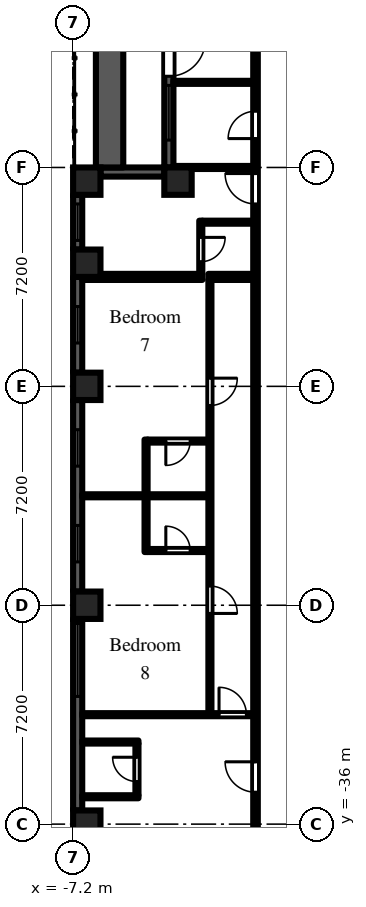
"""IFC4 building model, lengths in metres.
Left out: names, types, materials, properties, quantities, classifications, styles, units other than length and angle.
Written with IfcOpenShell. Run it as: python <this file> out.ifc"""

import sys

from ifc_helpers import new_model, si_unit, direction, frame, frame_2d, origin, origin_2d, place, context, subcontext, project, spatial, rectangle, extrude, element, fill, save


model = new_model("IFC4")
c1 = context("Model", 3, precision=1e-05, world=origin(), true_north=direction((0.0, 1.0)))
c2 = subcontext(c1, "Body", "Model", "MODEL_VIEW")
j1 = project(units=[si_unit("LENGTHUNIT", "METRE"), si_unit("PLANEANGLEUNIT", "RADIAN")], contexts=[c1])
p1 = place(None, origin())
s1 = spatial("IfcSite", under=j1, at=p1, CompositionType="ELEMENT")
p2 = place(p1, origin())
s2 = spatial("IfcBuilding", under=s1, at=p2, CompositionType="ELEMENT")
p3 = place(p2, frame((0.0, 0.0, 53.7)))
s3 = spatial("IfcBuildingStorey", under=s2, at=p3, CompositionType="ELEMENT", Elevation=53.7)
for number, where, z_axis, x_axis in (
    (1, (-6.75, -36.0, 0.0), (0.0, 0.0, 1.0), (1.0, 0.0, 0.0)),
    (2, (-6.75, -28.8, 0.0), (0.0, 0.0, 1.0), (1.0, 0.0, 0.0)),
    (3, (-6.75, -21.6, 0.0), (0.0, 0.0, 1.0), (1.0, 0.0, 0.0)),
    (4, (-6.75, -17.55, 0.0), (0.0, 0.0, 1.0), (1.0, 0.0, 0.0)),
    (5, (-6.75, -14.85, 0.0), (0.0, 0.0, 1.0), (1.0, 0.0, 0.0)),
    (6, (-3.75, -14.85, 0.0), (0.0, 0.0, 1.0), (1.0, 0.0, 0.0)),
):
    element("IfcColumn", number, at=place(p3, frame(where, z_axis=z_axis, x_axis=x_axis)), inside=s3, PredefinedType="COLUMN", context=c2, shape_type="SweptSolid", body=[
        extrude(rectangle(XDim=0.9, YDim=0.9, at=origin_2d()), origin(), (0.0, 0.0, 1.0), 3.0),
    ])
p4 = place(p3, frame((-4.05, -7.2, 0.0), z_axis=(0.0, 0.0, 1.0), x_axis=(0.0, -1.0, 0.0)))
e7 = element("IfcWall", 7, at=p4, inside=s3, PredefinedType="SOLIDWALL", context=c2, shape_type="SweptSolid", body=[
    extrude(rectangle(XDim=7.2, YDim=0.3, at=frame_2d((3.6, 0.0))), origin(), (0.0, 0.0, 1.0), 2.1),
])
p5 = place(p4, frame((3.0, 0.0, 0.0)))
e8 = element("IfcOpeningElement", 8, at=p5, cuts=e7, PredefinedType="OPENING", context=c2, shape_type="SweptSolid", body=[
    extrude(rectangle(XDim=1.2, YDim=2.05, at=frame_2d((0.6, 1.025))), frame((0.0, 0.16, 0.0), z_axis=(0.0, -1.0, 0.0), x_axis=(1.0, 0.0, 0.0)), (0.0, 0.0, 1.0), 0.32),
])
p6 = place(p4, frame((0.9, 0.0, 0.2)))
e9 = element("IfcOpeningElement", 9, at=p6, cuts=e7, PredefinedType="OPENING", context=c2, shape_type="SweptSolid", body=[
    extrude(rectangle(XDim=1.8, YDim=1.85, at=frame_2d((0.9, 0.925))), frame((0.0, 0.16, 0.0), z_axis=(0.0, -1.0, 0.0), x_axis=(1.0, 0.0, 0.0)), (0.0, 0.0, 1.0), 0.32),
])
p7 = place(p4, frame((4.5, 0.0, 0.2)))
e10 = element("IfcOpeningElement", 10, at=p7, cuts=e7, PredefinedType="OPENING", context=c2, shape_type="SweptSolid", body=[
    extrude(rectangle(XDim=1.8, YDim=1.85, at=frame_2d((0.9, 0.925))), frame((0.0, 0.16, 0.0), z_axis=(0.0, -1.0, 0.0), x_axis=(1.0, 0.0, 0.0)), (0.0, 0.0, 1.0), 0.32),
])
p8 = place(p3, frame((-4.2, -14.55, 0.0), z_axis=(0.0, 0.0, 1.0), x_axis=(-1.0, 0.0, 0.0)))
e11 = element("IfcWall", 11, at=p8, inside=s3, PredefinedType="SOLIDWALL", context=c2, shape_type="SweptSolid", body=[
    extrude(rectangle(XDim=2.1, YDim=0.3, at=frame_2d((1.05, 0.0))), origin(), (0.0, 0.0, 1.0), 2.1),
])
p9 = place(p3, frame((-7.05, -15.3, 0.0), z_axis=(0.0, 0.0, 1.0), x_axis=(0.0, -1.0, 0.0)))
e12 = element("IfcWall", 12, at=p9, inside=s3, PredefinedType="SOLIDWALL", context=c2, shape_type="SweptSolid", body=[
    extrude(rectangle(XDim=1.8, YDim=0.3, at=frame_2d((0.9, 0.0))), origin(), (0.0, 0.0, 1.0), 2.1),
])
p10 = place(p9, frame((0.3, 0.0, 0.2)))
e13 = element("IfcOpeningElement", 13, at=p10, cuts=e12, PredefinedType="OPENING", context=c2, shape_type="SweptSolid", body=[
    extrude(rectangle(XDim=1.2, YDim=1.85, at=frame_2d((0.6, 0.925))), frame((0.0, 0.16, 0.0), z_axis=(0.0, -1.0, 0.0), x_axis=(1.0, 0.0, 0.0)), (0.0, 0.0, 1.0), 0.32),
])
p11 = place(p3, frame((-7.05, -18.0, 0.0), z_axis=(0.0, 0.0, 1.0), x_axis=(0.0, -1.0, 0.0)))
e14 = element("IfcWall", 14, at=p11, inside=s3, PredefinedType="SOLIDWALL", context=c2, shape_type="SweptSolid", body=[
    extrude(rectangle(XDim=3.15, YDim=0.3, at=frame_2d((1.575, 0.0))), origin(), (0.0, 0.0, 1.0), 2.1),
])
p12 = place(p11, frame((0.975, 0.0, 0.2)))
e15 = element("IfcOpeningElement", 15, at=p12, cuts=e14, PredefinedType="OPENING", context=c2, shape_type="SweptSolid", body=[
    extrude(rectangle(XDim=1.2, YDim=1.85, at=frame_2d((0.6, 0.925))), frame((0.0, 0.16, 0.0), z_axis=(0.0, -1.0, 0.0), x_axis=(1.0, 0.0, 0.0)), (0.0, 0.0, 1.0), 0.32),
])
p13 = place(p3, frame((-7.05, -22.05, 0.0), z_axis=(0.0, 0.0, 1.0), x_axis=(0.0, -1.0, 0.0)))
e16 = element("IfcWall", 16, at=p13, inside=s3, PredefinedType="SOLIDWALL", context=c2, shape_type="SweptSolid", body=[
    extrude(rectangle(XDim=6.3, YDim=0.3, at=frame_2d((3.15, 0.0))), origin(), (0.0, 0.0, 1.0), 2.1),
])
p14 = place(p13, frame((0.975, 0.0, 0.2)))
e17 = element("IfcOpeningElement", 17, at=p14, cuts=e16, PredefinedType="OPENING", context=c2, shape_type="SweptSolid", body=[
    extrude(rectangle(XDim=1.2, YDim=1.85, at=frame_2d((0.6, 0.925))), frame((0.0, 0.16, 0.0), z_axis=(0.0, -1.0, 0.0), x_axis=(1.0, 0.0, 0.0)), (0.0, 0.0, 1.0), 0.32),
])
p15 = place(p13, frame((4.125, 0.0, 0.2)))
e18 = element("IfcOpeningElement", 18, at=p15, cuts=e16, PredefinedType="OPENING", context=c2, shape_type="SweptSolid", body=[
    extrude(rectangle(XDim=1.2, YDim=1.85, at=frame_2d((0.6, 0.925))), frame((0.0, 0.16, 0.0), z_axis=(0.0, -1.0, 0.0), x_axis=(1.0, 0.0, 0.0)), (0.0, 0.0, 1.0), 0.32),
])
p16 = place(p3, frame((-7.05, -29.25, 0.0), z_axis=(0.0, 0.0, 1.0), x_axis=(0.0, -1.0, 0.0)))
e19 = element("IfcWall", 19, at=p16, inside=s3, PredefinedType="SOLIDWALL", context=c2, shape_type="SweptSolid", body=[
    extrude(rectangle(XDim=6.3, YDim=0.3, at=frame_2d((3.15, 0.0))), origin(), (0.0, 0.0, 1.0), 2.1),
])
p17 = place(p16, frame((0.15, 0.0, 0.2)))
e20 = element("IfcOpeningElement", 20, at=p17, cuts=e19, PredefinedType="OPENING", context=c2, shape_type="SweptSolid", body=[
    extrude(rectangle(XDim=2.4, YDim=1.85, at=frame_2d((1.2, 0.925))), frame((0.0, 0.16, 0.0), z_axis=(0.0, -1.0, 0.0), x_axis=(1.0, 0.0, 0.0)), (0.0, 0.0, 1.0), 0.32),
])
p18 = place(p3, frame((-6.0, -14.4, 0.0), z_axis=(0.0, 0.0, 1.0), x_axis=(0.0, 1.0, 0.0)))
e21 = element("IfcWall", 21, at=p18, inside=s3, PredefinedType="PARAPET", context=c2, shape_type="SweptSolid", body=[
    extrude(rectangle(XDim=7.2, YDim=0.9, at=frame_2d((3.6, 0.0))), origin(), (0.0, 0.0, 1.0), 0.8),
])
for number, where, z_axis, x_axis in (
    (22, (-6.9, -35.1, 0.0), (0.0, 0.0, 1.0), (1.0, 0.0, 0.0)),
    (23, (-6.9, -33.3, 0.0), (0.0, 0.0, 1.0), (1.0, 0.0, 0.0)),
):
    element("IfcWall", number, at=place(p3, frame(where, z_axis=z_axis, x_axis=x_axis)), inside=s3, PredefinedType="PARTITIONING", context=c2, shape_type="SweptSolid", body=[
        extrude(rectangle(XDim=1.85, YDim=0.1, at=frame_2d((0.925, 0.0))), origin(), (0.0, 0.0, 1.0), 2.575),
    ])
p19 = place(p3, frame((-6.9, -32.4, 0.0), z_axis=(0.0, 0.0, 1.0), x_axis=(1.0, 0.0, 0.0)))
e24 = element("IfcWall", 24, at=p19, inside=s3, PredefinedType="PARTITIONING", context=c2, shape_type="SweptSolid", body=[
    extrude(rectangle(XDim=5.625, YDim=0.1, at=frame_2d((2.812, 0.0))), origin(), (0.0, 0.0, 1.0), 2.575),
])
p20 = place(p19, frame((4.5, 0.0, 0.0)))
e25 = element("IfcOpeningElement", 25, at=p20, cuts=e24, PredefinedType="OPENING", context=c2, shape_type="SweptSolid", body=[
    extrude(rectangle(XDim=0.9, YDim=2.1, at=frame_2d((0.45, 1.05))), frame((0.0, 0.06, 0.0), z_axis=(0.0, -1.0, 0.0), x_axis=(1.0, 0.0, 0.0)), (0.0, 0.0, 1.0), 0.12),
])
p21 = place(p3, frame((-6.9, -25.2, 0.0), z_axis=(0.0, 0.0, 1.0), x_axis=(1.0, 0.0, 0.0)))
e26 = element("IfcWall", 26, at=p21, inside=s3, PredefinedType="PARTITIONING", context=c2, shape_type="SweptSolid", body=[
    extrude(rectangle(XDim=4.15, YDim=0.1, at=frame_2d((2.075, 0.0))), origin(), (0.0, 0.0, 1.0), 2.575),
])
p22 = place(p3, frame((-6.9, -18.0, 0.0), z_axis=(0.0, 0.0, 1.0), x_axis=(1.0, 0.0, 0.0)))
e27 = element("IfcWall", 27, at=p22, inside=s3, PredefinedType="PARTITIONING", context=c2, shape_type="SweptSolid", body=[
    extrude(rectangle(XDim=3.95, YDim=0.2, at=frame_2d((1.975, 0.0))), origin(), (0.0, 0.0, 1.0), 2.575),
])
p23 = place(p3, frame((-5.1, -35.05, 0.0), z_axis=(0.0, 0.0, 1.0), x_axis=(0.0, 1.0, 0.0)))
e28 = element("IfcWall", 28, at=p23, inside=s3, PredefinedType="PARTITIONING", context=c2, shape_type="SweptSolid", body=[
    extrude(rectangle(XDim=1.7, YDim=0.1, at=frame_2d((0.85, 0.0))), origin(), (0.0, 0.0, 1.0), 2.575),
])
p24 = place(p23, frame((0.45, 0.0, 0.0)))
e29 = element("IfcOpeningElement", 29, at=p24, cuts=e28, PredefinedType="OPENING", context=c2, shape_type="SweptSolid", body=[
    extrude(rectangle(XDim=0.8, YDim=2.1, at=frame_2d((0.4, 1.05))), frame((0.0, 0.06, 0.0), z_axis=(0.0, -1.0, 0.0), x_axis=(1.0, 0.0, 0.0)), (0.0, 0.0, 1.0), 0.12),
])
p25 = place(p3, frame((-4.8, -27.05, 0.0), z_axis=(0.0, 0.0, 1.0), x_axis=(0.0, 1.0, 0.0)))
e30 = element("IfcWall", 30, at=p25, inside=s3, PredefinedType="PARTITIONING", context=c2, shape_type="SweptSolid", body=[
    extrude(rectangle(XDim=3.7, YDim=0.1, at=frame_2d((1.85, 0.0))), origin(), (0.0, 0.0, 1.0), 2.575),
])
p26 = place(p3, frame((-4.75, -27.0, 0.0), z_axis=(0.0, 0.0, 1.0), x_axis=(1.0, 0.0, 0.0)))
e31 = element("IfcWall", 31, at=p26, inside=s3, PredefinedType="PARTITIONING", context=c2, shape_type="SweptSolid", body=[
    extrude(rectangle(XDim=2.0, YDim=0.1, at=frame_2d((1.0, 0.0))), origin(), (0.0, 0.0, 1.0), 2.575),
])
p27 = place(p26, frame((0.6, 0.0, 0.0)))
e32 = element("IfcOpeningElement", 32, at=p27, cuts=e31, PredefinedType="OPENING", context=c2, shape_type="SweptSolid", body=[
    extrude(rectangle(XDim=0.8, YDim=2.1, at=frame_2d((0.4, 1.05))), frame((0.0, 0.06, 0.0), z_axis=(0.0, -1.0, 0.0), x_axis=(1.0, 0.0, 0.0)), (0.0, 0.0, 1.0), 0.12),
])
p28 = place(p3, frame((-4.75, -23.4, 0.0), z_axis=(0.0, 0.0, 1.0), x_axis=(1.0, 0.0, 0.0)))
e33 = element("IfcWall", 33, at=p28, inside=s3, PredefinedType="PARTITIONING", context=c2, shape_type="SweptSolid", body=[
    extrude(rectangle(XDim=2.0, YDim=0.1, at=frame_2d((1.0, 0.0))), origin(), (0.0, 0.0, 1.0), 2.575),
])
p29 = place(p28, frame((0.6, 0.0, 0.0)))
e34 = element("IfcOpeningElement", 34, at=p29, cuts=e33, PredefinedType="OPENING", context=c2, shape_type="SweptSolid", body=[
    extrude(rectangle(XDim=0.8, YDim=2.1, at=frame_2d((0.4, 1.05))), frame((0.0, 0.06, 0.0), z_axis=(0.0, -1.0, 0.0), x_axis=(1.0, 0.0, 0.0)), (0.0, 0.0, 1.0), 0.12),
])
for number, where, z_axis, x_axis in (
    (35, (-3.9, -14.4, 0.0), (0.0, 0.0, 1.0), (1.0, 0.0, 0.0)),
    (36, (-3.9, -11.6, 0.0), (0.0, 0.0, 1.0), (1.0, 0.0, 0.0)),
):
    element("IfcWall", number, at=place(p3, frame(where, z_axis=z_axis, x_axis=x_axis)), inside=s3, PredefinedType="PARTITIONING", context=c2, shape_type="SweptSolid", body=[
        extrude(rectangle(XDim=2.625, YDim=0.1, at=frame_2d((1.312, 0.0))), origin(), (0.0, 0.0, 1.0), 2.575),
    ])
p30 = place(p3, frame((-3.0, -17.9, 0.0), z_axis=(0.0, 0.0, 1.0), x_axis=(0.0, 1.0, 0.0)))
e37 = element("IfcWall", 37, at=p30, inside=s3, PredefinedType="PARTITIONING", context=c2, shape_type="SweptSolid", body=[
    extrude(rectangle(XDim=1.75, YDim=0.1, at=frame_2d((0.875, 0.0))), origin(), (0.0, 0.0, 1.0), 2.575),
])
p31 = place(p30, frame((0.4, 0.0, 0.0)))
e38 = element("IfcOpeningElement", 38, at=p31, cuts=e37, PredefinedType="OPENING", context=c2, shape_type="SweptSolid", body=[
    extrude(rectangle(XDim=0.8, YDim=2.1, at=frame_2d((0.4, 1.05))), frame((0.0, 0.06, 0.0), z_axis=(0.0, -1.0, 0.0), x_axis=(1.0, 0.0, 0.0)), (0.0, 0.0, 1.0), 0.12),
])
p32 = place(p3, frame((-2.95, -16.2, 0.0), z_axis=(0.0, 0.0, 1.0), x_axis=(1.0, 0.0, 0.0)))
e39 = element("IfcWall", 39, at=p32, inside=s3, PredefinedType="PARTITIONING", context=c2, shape_type="SweptSolid", body=[
    extrude(rectangle(XDim=1.675, YDim=0.1, at=frame_2d((0.837, 0.0))), origin(), (0.0, 0.0, 1.0), 2.575),
])
p33 = place(p3, frame((-2.7, -32.35, 0.0), z_axis=(0.0, 0.0, 1.0), x_axis=(0.0, 1.0, 0.0)))
e40 = element("IfcWall", 40, at=p33, inside=s3, PredefinedType="PARTITIONING", context=c2, shape_type="SweptSolid", body=[
    extrude(rectangle(XDim=14.25, YDim=0.1, at=frame_2d((7.125, 0.0))), origin(), (0.0, 0.0, 1.0), 2.575),
])
p34 = place(p33, frame((3.28, 0.0, 0.0)))
e41 = element("IfcOpeningElement", 41, at=p34, cuts=e40, PredefinedType="OPENING", context=c2, shape_type="SweptSolid", body=[
    extrude(rectangle(XDim=0.9, YDim=2.1, at=frame_2d((0.45, 1.05))), frame((0.0, 0.06, 0.0), z_axis=(0.0, -1.0, 0.0), x_axis=(1.0, 0.0, 0.0)), (0.0, 0.0, 1.0), 0.12),
])
p35 = place(p33, frame((10.12, 0.0, 0.0)))
e42 = element("IfcOpeningElement", 42, at=p35, cuts=e40, PredefinedType="OPENING", context=c2, shape_type="SweptSolid", body=[
    extrude(rectangle(XDim=0.9, YDim=2.1, at=frame_2d((0.45, 1.05))), frame((0.0, 0.06, 0.0), z_axis=(0.0, -1.0, 0.0), x_axis=(1.0, 0.0, 0.0)), (0.0, 0.0, 1.0), 0.12),
])
p36 = place(p3, frame((-2.75, -18.0, 0.0), z_axis=(0.0, 0.0, 1.0), x_axis=(1.0, 0.0, 0.0)))
e43 = element("IfcWall", 43, at=p36, inside=s3, PredefinedType="PARTITIONING", context=c2, shape_type="SweptSolid", body=[
    extrude(rectangle(XDim=1.475, YDim=0.2, at=frame_2d((0.738, 0.0))), origin(), (0.0, 0.0, 1.0), 2.575),
])
p37 = place(p3, frame((-1.2, -36.5, 0.0), z_axis=(0.0, 0.0, 1.0), x_axis=(0.0, 1.0, 0.0)))
e44 = element("IfcWall", 44, at=p37, inside=s3, PredefinedType="PARTITIONING", context=c2, shape_type="SweptSolid", body=[
    extrude(rectangle(XDim=35.225, YDim=0.15, at=frame_2d((17.613, 0.0))), origin(), (0.0, 0.0, 1.0), 2.575),
])
p38 = place(p37, frame((31.85, 0.0, 0.0)))
e45 = element("IfcOpeningElement", 45, at=p38, cuts=e44, PredefinedType="OPENING", context=c2, shape_type="SweptSolid", body=[
    extrude(rectangle(XDim=0.9, YDim=2.1, at=frame_2d((0.45, 1.05))), frame((0.0, 0.085, 0.0), z_axis=(0.0, -1.0, 0.0), x_axis=(1.0, 0.0, 0.0)), (0.0, 0.0, 1.0), 0.17),
])
p39 = place(p37, frame((23.05, 0.0, 0.0)))
e46 = element("IfcOpeningElement", 46, at=p39, cuts=e44, PredefinedType="OPENING", context=c2, shape_type="SweptSolid", body=[
    extrude(rectangle(XDim=0.9, YDim=2.1, at=frame_2d((0.45, 1.05))), frame((0.0, 0.085, 0.0), z_axis=(0.0, -1.0, 0.0), x_axis=(1.0, 0.0, 0.0)), (0.0, 0.0, 1.0), 0.17),
])
p40 = place(p37, frame((26.65, 0.0, 0.0)))
e47 = element("IfcOpeningElement", 47, at=p40, cuts=e44, PredefinedType="OPENING", context=c2, shape_type="SweptSolid", body=[
    extrude(rectangle(XDim=0.9, YDim=2.1, at=frame_2d((0.45, 1.05))), frame((0.0, 0.085, 0.0), z_axis=(0.0, -1.0, 0.0), x_axis=(1.0, 0.0, 0.0)), (0.0, 0.0, 1.0), 0.17),
])
p41 = place(p37, frame((20.9, 0.0, 0.0)))
e48 = element("IfcOpeningElement", 48, at=p41, cuts=e44, PredefinedType="OPENING", context=c2, shape_type="SweptSolid", body=[
    extrude(rectangle(XDim=1.0, YDim=2.1, at=frame_2d((0.5, 1.05))), frame((0.0, 0.085, 0.0), z_axis=(0.0, -1.0, 0.0), x_axis=(1.0, 0.0, 0.0)), (0.0, 0.0, 1.0), 0.17),
])
p42 = place(p37, frame((1.55, 0.0, 0.0)))
e49 = element("IfcOpeningElement", 49, at=p42, cuts=e44, PredefinedType="OPENING", context=c2, shape_type="SweptSolid", body=[
    extrude(rectangle(XDim=1.0, YDim=2.1, at=frame_2d((0.5, 1.05))), frame((0.0, 0.085, 0.0), z_axis=(0.0, -1.0, 0.0), x_axis=(1.0, 0.0, 0.0)), (0.0, 0.0, 1.0), 0.17),
])
p43 = place(p5, origin())
e50 = element("IfcDoor", 50, at=p43, inside=s3, OperationType="SINGLE_SWING_LEFT", PredefinedType="DOOR", context=c2, shape_type="SweptSolid", body=[
    extrude(rectangle(XDim=1.2, YDim=2.05, at=frame_2d((0.6, 1.025))), frame((0.0, 0.025, 0.0), z_axis=(0.0, -1.0, 0.0), x_axis=(1.0, 0.0, 0.0)), (0.0, 0.0, 1.0), 0.05),
])
fill(e8, e50)
p44 = place(p7, origin())
e51 = element("IfcWindow", 51, at=p44, inside=s3, PartitioningType="SINGLE_PANEL", PredefinedType="WINDOW", context=c2, shape_type="SweptSolid", body=[
    extrude(rectangle(XDim=1.8, YDim=1.85, at=frame_2d((0.9, 0.925))), frame((0.0, 0.03, 0.0), z_axis=(0.0, -1.0, 0.0), x_axis=(1.0, 0.0, 0.0)), (0.0, 0.0, 1.0), 0.06),
])
fill(e10, e51)
p45 = place(p10, origin())
e52 = element("IfcWindow", 52, at=p45, inside=s3, PartitioningType="SINGLE_PANEL", PredefinedType="WINDOW", context=c2, shape_type="SweptSolid", body=[
    extrude(rectangle(XDim=1.2, YDim=1.85, at=frame_2d((0.6, 0.925))), frame((0.0, 0.03, 0.0), z_axis=(0.0, -1.0, 0.0), x_axis=(1.0, 0.0, 0.0)), (0.0, 0.0, 1.0), 0.06),
])
fill(e13, e52)
p46 = place(p12, origin())
e53 = element("IfcWindow", 53, at=p46, inside=s3, PartitioningType="SINGLE_PANEL", PredefinedType="WINDOW", context=c2, shape_type="SweptSolid", body=[
    extrude(rectangle(XDim=1.2, YDim=1.85, at=frame_2d((0.6, 0.925))), frame((0.0, 0.03, 0.0), z_axis=(0.0, -1.0, 0.0), x_axis=(1.0, 0.0, 0.0)), (0.0, 0.0, 1.0), 0.06),
])
fill(e15, e53)
p47 = place(p14, origin())
e54 = element("IfcWindow", 54, at=p47, inside=s3, PartitioningType="SINGLE_PANEL", PredefinedType="WINDOW", context=c2, shape_type="SweptSolid", body=[
    extrude(rectangle(XDim=1.2, YDim=1.85, at=frame_2d((0.6, 0.925))), frame((0.0, 0.03, 0.0), z_axis=(0.0, -1.0, 0.0), x_axis=(1.0, 0.0, 0.0)), (0.0, 0.0, 1.0), 0.06),
])
fill(e17, e54)
p48 = place(p15, origin())
e55 = element("IfcWindow", 55, at=p48, inside=s3, PartitioningType="SINGLE_PANEL", PredefinedType="WINDOW", context=c2, shape_type="SweptSolid", body=[
    extrude(rectangle(XDim=1.2, YDim=1.85, at=frame_2d((0.6, 0.925))), frame((0.0, 0.03, 0.0), z_axis=(0.0, -1.0, 0.0), x_axis=(1.0, 0.0, 0.0)), (0.0, 0.0, 1.0), 0.06),
])
fill(e18, e55)
p49 = place(p17, origin())
e56 = element("IfcWindow", 56, at=p49, inside=s3, PartitioningType="SINGLE_PANEL", PredefinedType="WINDOW", context=c2, shape_type="SweptSolid", body=[
    extrude(rectangle(XDim=2.4, YDim=1.85, at=frame_2d((1.2, 0.925))), frame((0.0, 0.03, 0.0), z_axis=(0.0, -1.0, 0.0), x_axis=(1.0, 0.0, 0.0)), (0.0, 0.0, 1.0), 0.06),
])
fill(e20, e56)
p50 = place(p39, origin())
e57 = element("IfcDoor", 57, at=p50, inside=s3, OperationType="SINGLE_SWING_LEFT", PredefinedType="DOOR", context=c2, shape_type="SweptSolid", body=[
    extrude(rectangle(XDim=0.9, YDim=2.1, at=frame_2d((0.45, 1.05))), frame((0.0, 0.025, 0.0), z_axis=(0.0, -1.0, 0.0), x_axis=(1.0, 0.0, 0.0)), (0.0, 0.0, 1.0), 0.05),
])
fill(e46, e57)
p51 = place(p31, frame((0.8, 0.0, 0.0), z_axis=(0.0, 0.0, 1.0), x_axis=(-1.0, 0.0, 0.0)))
e58 = element("IfcDoor", 58, at=p51, inside=s3, OperationType="SINGLE_SWING_LEFT", PredefinedType="DOOR", context=c2, shape_type="SweptSolid", body=[
    extrude(rectangle(XDim=0.8, YDim=2.1, at=frame_2d((0.4, 1.05))), frame((0.0, 0.025, 0.0), z_axis=(0.0, -1.0, 0.0), x_axis=(1.0, 0.0, 0.0)), (0.0, 0.0, 1.0), 0.05),
])
fill(e38, e58)
p52 = place(p41, origin())
e59 = element("IfcDoor", 59, at=p52, inside=s3, OperationType="SINGLE_SWING_RIGHT", PredefinedType="DOOR", context=c2, shape_type="SweptSolid", body=[
    extrude(rectangle(XDim=1.0, YDim=2.1, at=frame_2d((0.5, 1.05))), frame((0.0, 0.025, 0.0), z_axis=(0.0, -1.0, 0.0), x_axis=(1.0, 0.0, 0.0)), (0.0, 0.0, 1.0), 0.05),
])
fill(e48, e59)
p53 = place(p24, origin())
e60 = element("IfcDoor", 60, at=p53, inside=s3, OperationType="SINGLE_SWING_RIGHT", PredefinedType="DOOR", context=c2, shape_type="SweptSolid", body=[
    extrude(rectangle(XDim=0.8, YDim=2.1, at=frame_2d((0.4, 1.05))), frame((0.0, 0.025, 0.0), z_axis=(0.0, -1.0, 0.0), x_axis=(1.0, 0.0, 0.0)), (0.0, 0.0, 1.0), 0.05),
])
fill(e29, e60)
p54 = place(p42, origin())
e61 = element("IfcDoor", 61, at=p54, inside=s3, OperationType="SINGLE_SWING_RIGHT", PredefinedType="DOOR", context=c2, shape_type="SweptSolid", body=[
    extrude(rectangle(XDim=1.0, YDim=2.1, at=frame_2d((0.5, 1.05))), frame((0.0, 0.025, 0.0), z_axis=(0.0, -1.0, 0.0), x_axis=(1.0, 0.0, 0.0)), (0.0, 0.0, 1.0), 0.05),
])
fill(e49, e61)
p55 = place(p34, frame((0.9, 0.0, 0.0), z_axis=(0.0, 0.0, 1.0), x_axis=(-1.0, 0.0, 0.0)))
e62 = element("IfcDoor", 62, at=p55, inside=s3, OperationType="SINGLE_SWING_RIGHT", PredefinedType="DOOR", context=c2, shape_type="SweptSolid", body=[
    extrude(rectangle(XDim=0.9, YDim=2.1, at=frame_2d((0.45, 1.05))), frame((0.0, 0.025, 0.0), z_axis=(0.0, -1.0, 0.0), x_axis=(1.0, 0.0, 0.0)), (0.0, 0.0, 1.0), 0.05),
])
fill(e41, e62)
p56 = place(p35, frame((0.9, 0.0, 0.0), z_axis=(0.0, 0.0, 1.0), x_axis=(-1.0, 0.0, 0.0)))
e63 = element("IfcDoor", 63, at=p56, inside=s3, OperationType="SINGLE_SWING_LEFT", PredefinedType="DOOR", context=c2, shape_type="SweptSolid", body=[
    extrude(rectangle(XDim=0.9, YDim=2.1, at=frame_2d((0.45, 1.05))), frame((0.0, 0.025, 0.0), z_axis=(0.0, -1.0, 0.0), x_axis=(1.0, 0.0, 0.0)), (0.0, 0.0, 1.0), 0.05),
])
fill(e42, e63)
p57 = place(p20, origin())
e64 = element("IfcDoor", 64, at=p57, inside=s3, OperationType="SINGLE_SWING_LEFT", PredefinedType="DOOR", context=c2, shape_type="SweptSolid", body=[
    extrude(rectangle(XDim=0.9, YDim=2.1, at=frame_2d((0.45, 1.05))), frame((0.0, 0.025, 0.0), z_axis=(0.0, -1.0, 0.0), x_axis=(1.0, 0.0, 0.0)), (0.0, 0.0, 1.0), 0.05),
])
fill(e25, e64)
p58 = place(p29, frame((0.8, 0.0, 0.0), z_axis=(0.0, 0.0, 1.0), x_axis=(-1.0, 0.0, 0.0)))
e65 = element("IfcDoor", 65, at=p58, inside=s3, OperationType="SINGLE_SWING_RIGHT", PredefinedType="DOOR", context=c2, shape_type="SweptSolid", body=[
    extrude(rectangle(XDim=0.8, YDim=2.1, at=frame_2d((0.4, 1.05))), frame((0.0, 0.025, 0.0), z_axis=(0.0, -1.0, 0.0), x_axis=(1.0, 0.0, 0.0)), (0.0, 0.0, 1.0), 0.05),
])
fill(e34, e65)
p59 = place(p27, origin())
e66 = element("IfcDoor", 66, at=p59, inside=s3, OperationType="SINGLE_SWING_LEFT", PredefinedType="DOOR", context=c2, shape_type="SweptSolid", body=[
    extrude(rectangle(XDim=0.8, YDim=2.1, at=frame_2d((0.4, 1.05))), frame((0.0, 0.025, 0.0), z_axis=(0.0, -1.0, 0.0), x_axis=(1.0, 0.0, 0.0)), (0.0, 0.0, 1.0), 0.05),
])
fill(e32, e66)
save(model, sys.argv[1])
